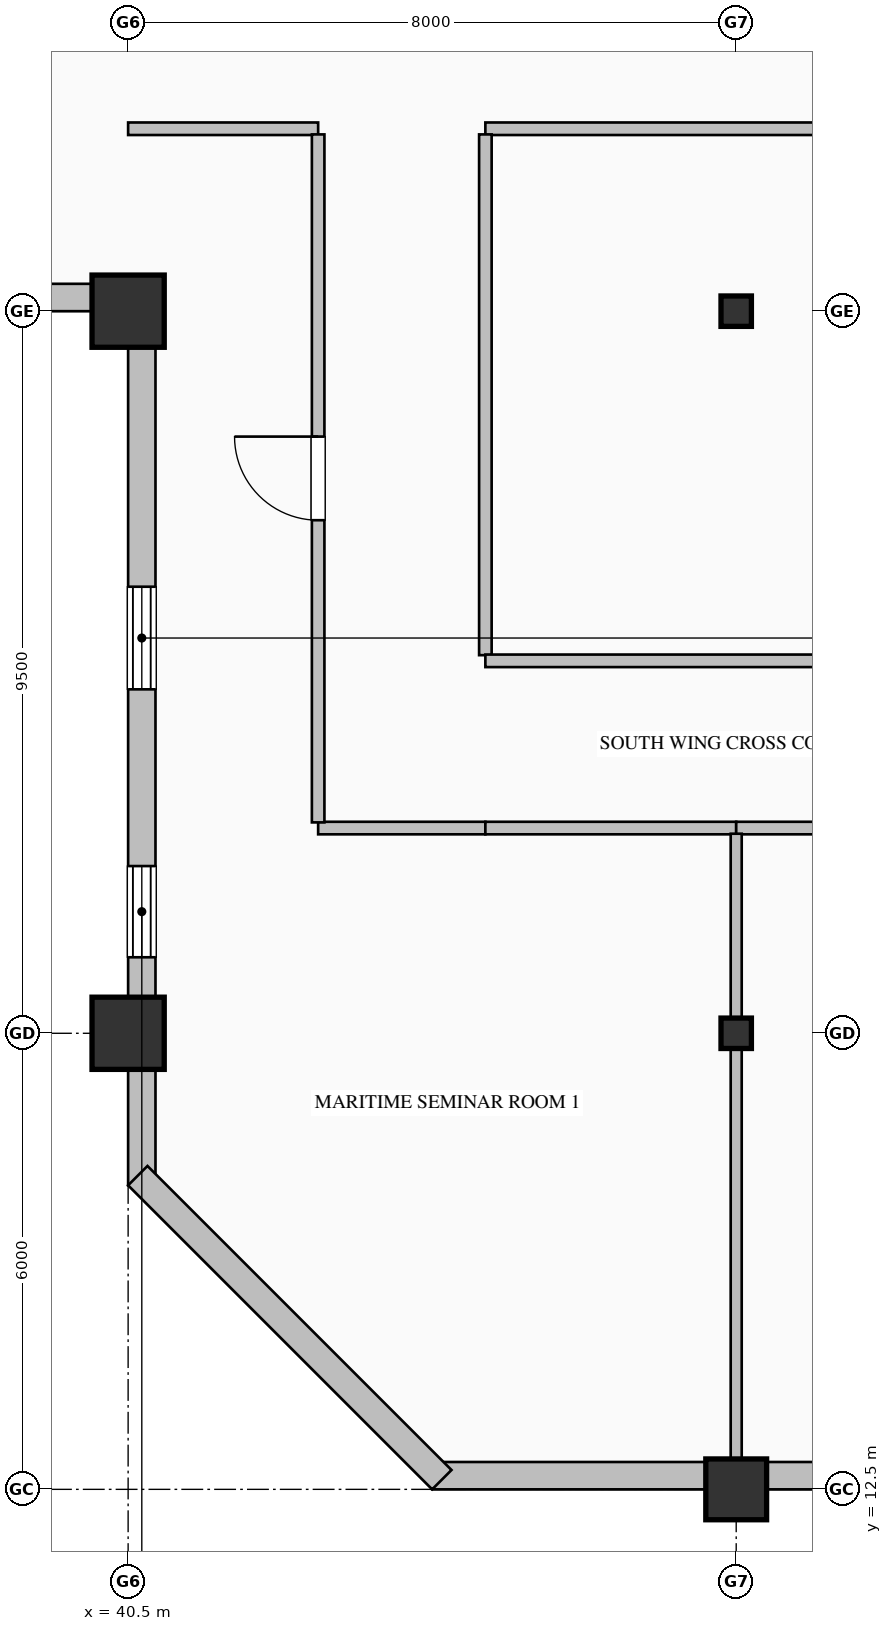
"""IFC4 building model, lengths in metres.
Left out: names, types, materials, properties, quantities, classifications, styles, units other than length and angle.
Written with IfcOpenShell. Run it as: python <this file> out.ifc"""

import sys

from ifc_helpers import new_model, si_unit, direction, frame, frame_2d, origin, origin_2d, place, context, subcontext, project, spatial, rectangle, hollow_rectangle, i_section, extrude, element, fill, save


model = new_model("IFC4")
c1 = context("Model", 3, precision=1e-05, world=origin(), true_north=direction((0.0, 1.0)))
c2 = subcontext(c1, "Body", "Model", "MODEL_VIEW")
j1 = project(units=[si_unit("LENGTHUNIT", "METRE"), si_unit("PLANEANGLEUNIT", "RADIAN")], contexts=[c1])
p1 = place(None, origin())
s1 = spatial("IfcSite", under=j1, at=p1, CompositionType="ELEMENT")
p2 = place(p1, origin())
s2 = spatial("IfcBuilding", under=s1, at=p2, CompositionType="ELEMENT")
p3 = place(p2, frame((0.0, 0.0, 225.8)))
s3 = spatial("IfcBuildingStorey", under=s2, at=p3, CompositionType="ELEMENT", Elevation=225.8)
for number, where, z_axis, x_axis in (
    (1, (40.5, 18.5, 0.0), (0.0, 0.0, 1.0), (1.0, 0.0, 0.0)),
    (2, (40.5, 28.0, 0.0), (0.0, 0.0, 1.0), (1.0, 0.0, 0.0)),
):
    element("IfcColumn", number, at=place(p3, frame(where, z_axis=z_axis, x_axis=x_axis)), inside=s3, PredefinedType="COLUMN", context=c2, shape_type="SweptSolid", body=[
        extrude(hollow_rectangle(XDim=0.95, YDim=0.95, WallThickness=0.036, at=origin_2d()), origin(), (0.0, 0.0, 1.0), 4.0),
    ])
p4 = place(p3, frame((48.5, 12.5, 0.0), z_axis=(0.0, 0.0, 1.0), x_axis=(1.0, 0.0, 0.0)))
e3 = element("IfcColumn", 3, at=p4, inside=s3, PredefinedType="COLUMN", context=c2, shape_type="SweptSolid", body=[
    extrude(hollow_rectangle(XDim=0.8, YDim=0.8, WallThickness=0.032, at=origin_2d()), origin(), (0.0, 0.0, 1.0), 4.0),
])
for number, where, z_axis, x_axis in (
    (4, (48.5, 18.5, 0.0), (0.0, 0.0, 1.0), (1.0, 0.0, 0.0)),
    (5, (48.5, 28.0, 0.0), (0.0, 0.0, 1.0), (1.0, 0.0, 0.0)),
):
    element("IfcColumn", number, at=place(p3, frame(where, z_axis=z_axis, x_axis=x_axis)), inside=s3, PredefinedType="COLUMN", context=c2, shape_type="SweptSolid", body=[
        extrude(i_section(OverallWidth=0.4, OverallDepth=0.4, WebThickness=0.013, FlangeThickness=0.021, FilletRadius=0.022, at=origin_2d()), origin(), (0.0, 0.0, 1.0), 4.0),
    ])
p5 = place(p3, frame((40.68, 16.5, 0.0), z_axis=(0.0, 0.0, 1.0), x_axis=(0.0, 1.0, 0.0)))
e6 = element("IfcWall", 6, at=p5, inside=s3, PredefinedType="SOLIDWALL", context=c2, shape_type="SweptSolid", body=[
    extrude(rectangle(XDim=11.86, YDim=0.36, at=frame_2d((5.93, 0.0))), origin(), (0.0, 0.0, 1.0), 3.187),
])
p6 = place(p5, frame((3.0, 0.0, 0.9)))
e7 = element("IfcOpeningElement", 7, at=p6, cuts=e6, PredefinedType="OPENING", context=c2, shape_type="SweptSolid", body=[
    extrude(rectangle(XDim=1.2, YDim=1.85, at=frame_2d((0.6, 0.925))), frame((0.0, 0.19, 0.0), z_axis=(0.0, -1.0, 0.0), x_axis=(1.0, 0.0, 0.0)), (0.0, 0.0, 1.0), 0.38),
])
p7 = place(p5, frame((6.525, 0.0, 0.9)))
e8 = element("IfcOpeningElement", 8, at=p7, cuts=e6, PredefinedType="OPENING", context=c2, shape_type="SweptSolid", body=[
    extrude(rectangle(XDim=1.35, YDim=1.85, at=frame_2d((0.675, 0.925))), frame((0.0, 0.19, 0.0), z_axis=(0.0, -1.0, 0.0), x_axis=(1.0, 0.0, 0.0)), (0.0, 0.0, 1.0), 0.38),
])
p8 = place(p3, frame((40.52, 28.18, 0.0), z_axis=(0.0, 0.0, 1.0), x_axis=(-1.0, 0.0, 0.0)))
e9 = element("IfcWall", 9, at=p8, inside=s3, PredefinedType="SOLIDWALL", context=c2, shape_type="SweptSolid", body=[
    extrude(rectangle(XDim=27.52, YDim=0.36, at=frame_2d((13.76, 0.0))), origin(), (0.0, 0.0, 1.0), 3.187),
])
p9 = place(p8, frame((10.2, 0.0, 0.9)))
e10 = element("IfcOpeningElement", 10, at=p9, cuts=e9, PredefinedType="OPENING", context=c2, shape_type="SweptSolid", body=[
    extrude(rectangle(XDim=1.2, YDim=1.85, at=frame_2d((0.6, 0.925))), frame((0.0, 0.19, 0.0), z_axis=(0.0, -1.0, 0.0), x_axis=(1.0, 0.0, 0.0)), (0.0, 0.0, 1.0), 0.38),
])
p10 = place(p8, frame((13.725, 0.0, 0.9)))
e11 = element("IfcOpeningElement", 11, at=p10, cuts=e9, PredefinedType="OPENING", context=c2, shape_type="SweptSolid", body=[
    extrude(rectangle(XDim=1.35, YDim=1.85, at=frame_2d((0.675, 0.925))), frame((0.0, 0.19, 0.0), z_axis=(0.0, -1.0, 0.0), x_axis=(1.0, 0.0, 0.0)), (0.0, 0.0, 1.0), 0.38),
])
p11 = place(p8, frame((17.4, 0.0, 0.7)))
e12 = element("IfcOpeningElement", 12, at=p11, cuts=e9, PredefinedType="OPENING", context=c2, shape_type="SweptSolid", body=[
    extrude(rectangle(XDim=1.2, YDim=1.85, at=frame_2d((0.6, 0.925))), frame((0.0, 0.19, 0.0), z_axis=(0.0, -1.0, 0.0), x_axis=(1.0, 0.0, 0.0)), (0.0, 0.0, 1.0), 0.38),
])
p12 = place(p8, frame((21.0, 0.0, 0.9)))
e13 = element("IfcOpeningElement", 13, at=p12, cuts=e9, PredefinedType="OPENING", context=c2, shape_type="SweptSolid", body=[
    extrude(rectangle(XDim=1.2, YDim=1.85, at=frame_2d((0.6, 0.925))), frame((0.0, 0.19, 0.0), z_axis=(0.0, -1.0, 0.0), x_axis=(1.0, 0.0, 0.0)), (0.0, 0.0, 1.0), 0.38),
])
p13 = place(p3, frame((60.0, 12.68, 0.0), z_axis=(0.0, 0.0, 1.0), x_axis=(-1.0, 0.0, 0.0)))
e14 = element("IfcWall", 14, at=p13, inside=s3, PredefinedType="SOLIDWALL", context=c2, shape_type="SweptSolid", body=[
    extrude(rectangle(XDim=15.5, YDim=0.36, at=frame_2d((7.75, 0.0))), origin(), (0.0, 0.0, 1.0), 3.325),
])
p14 = place(p13, frame((6.6, 0.0, 0.9)))
e15 = element("IfcOpeningElement", 15, at=p14, cuts=e14, PredefinedType="OPENING", context=c2, shape_type="SweptSolid", body=[
    extrude(rectangle(XDim=1.2, YDim=1.85, at=frame_2d((0.6, 0.925))), frame((0.0, 0.19, 0.0), z_axis=(0.0, -1.0, 0.0), x_axis=(1.0, 0.0, 0.0)), (0.0, 0.0, 1.0), 0.38),
])
p15 = place(p3, frame((44.627, 12.627, 0.0), z_axis=(0.0, 0.0, 1.0), x_axis=(-0.707106781187, 0.707106781187, 0.0)))
e16 = element("IfcWall", 16, at=p15, inside=s3, PredefinedType="SOLIDWALL", context=c2, shape_type="SweptSolid", body=[
    extrude(rectangle(XDim=5.657, YDim=0.36, at=frame_2d((2.828, 0.0))), origin(), (0.0, 0.0, 1.0), 3.775),
])
p16 = place(p3, frame((56.5, 30.4, 0.0), z_axis=(0.0, 0.0, 1.0), x_axis=(-1.0, 0.0, 0.0)))
e17 = element("IfcWall", 17, at=p16, inside=s3, PredefinedType="PARTITIONING", context=c2, shape_type="SweptSolid", body=[
    extrude(rectangle(XDim=11.3, YDim=0.165, at=frame_2d((5.65, 0.0))), origin(), (0.0, 0.0, 1.0), 3.775),
])
p17 = place(p3, frame((43.0, 30.4, 0.0), z_axis=(0.0, 0.0, 1.0), x_axis=(-1.0, 0.0, 0.0)))
e18 = element("IfcWall", 18, at=p17, inside=s3, PredefinedType="PARTITIONING", context=c2, shape_type="SweptSolid", body=[
    extrude(rectangle(XDim=2.5, YDim=0.165, at=frame_2d((1.25, 0.0))), origin(), (0.0, 0.0, 1.0), 3.775),
])
p18 = place(p3, frame((45.2, 30.325, 0.0), z_axis=(0.0, 0.0, 1.0), x_axis=(0.0, -1.0, 0.0)))
e19 = element("IfcWall", 19, at=p18, inside=s3, PredefinedType="PARTITIONING", context=c2, shape_type="SweptSolid", body=[
    extrude(rectangle(XDim=6.851, YDim=0.165, at=frame_2d((3.425, 0.0))), origin(), (0.0, 0.0, 1.0), 3.775),
])
p19 = place(p3, frame((45.2, 21.2, 0.0), z_axis=(0.0, 0.0, 1.0), x_axis=(-1.0, 0.0, 0.0)))
e20 = element("IfcWall", 20, at=p19, inside=s3, PredefinedType="PARTITIONING", context=c2, shape_type="SweptSolid", body=[
    extrude(rectangle(XDim=2.2, YDim=0.165, at=frame_2d((1.1, 0.0))), origin(), (0.0, 0.0, 1.0), 3.775),
])
p20 = place(p3, frame((43.0, 21.274, 0.0), z_axis=(0.0, 0.0, 1.0), x_axis=(0.0, 1.0, 0.0)))
e21 = element("IfcWall", 21, at=p20, inside=s3, PredefinedType="PARTITIONING", context=c2, shape_type="SweptSolid", body=[
    extrude(rectangle(XDim=9.051, YDim=0.165, at=frame_2d((4.525, 0.0))), origin(), (0.0, 0.0, 1.0), 3.775),
])
p21 = place(p20, frame((3.976, 0.0, 0.0)))
e22 = element("IfcOpeningElement", 22, at=p21, cuts=e21, PredefinedType="OPENING", context=c2, shape_type="SweptSolid", body=[
    extrude(rectangle(XDim=1.1, YDim=2.2, at=frame_2d((0.55, 1.1))), frame((0.0, 0.093, 0.0), z_axis=(0.0, -1.0, 0.0), x_axis=(1.0, 0.0, 0.0)), (0.0, 0.0, 1.0), 0.185),
])
p22 = place(p3, frame((45.2, 23.4, 0.0), z_axis=(0.0, 0.0, 1.0), x_axis=(1.0, 0.0, 0.0)))
e23 = element("IfcWall", 23, at=p22, inside=s3, PredefinedType="PARTITIONING", context=c2, shape_type="SweptSolid", body=[
    extrude(rectangle(XDim=12.8, YDim=0.165, at=frame_2d((6.4, 0.0))), origin(), (0.0, 0.0, 1.0), 3.467),
])
p23 = place(p22, frame((5.9, 0.0, 0.0)))
e24 = element("IfcOpeningElement", 24, at=p23, cuts=e23, PredefinedType="OPENING", context=c2, shape_type="SweptSolid", body=[
    extrude(rectangle(XDim=1.0, YDim=2.15, at=frame_2d((0.5, 1.075))), frame((0.0, 0.093, 0.0), z_axis=(0.0, -1.0, 0.0), x_axis=(1.0, 0.0, 0.0)), (0.0, 0.0, 1.0), 0.185),
])
p24 = place(p3, frame((48.5, 21.2, 0.0), z_axis=(0.0, 0.0, 1.0), x_axis=(-1.0, 0.0, 0.0)))
e25 = element("IfcWall", 25, at=p24, inside=s3, PredefinedType="PARTITIONING", context=c2, shape_type="SweptSolid", body=[
    extrude(rectangle(XDim=3.3, YDim=0.165, at=frame_2d((1.65, 0.0))), origin(), (0.0, 0.0, 1.0), 3.775),
])
p25 = place(p3, frame((56.5, 21.2, 0.0), z_axis=(0.0, 0.0, 1.0), x_axis=(-1.0, 0.0, 0.0)))
e26 = element("IfcWall", 26, at=p25, inside=s3, PredefinedType="PARTITIONING", context=c2, shape_type="SweptSolid", body=[
    extrude(rectangle(XDim=8.0, YDim=0.165, at=frame_2d((4.0, 0.0))), origin(), (0.0, 0.0, 1.0), 3.775),
])
p26 = place(p25, frame((3.45, 0.0, 0.0)))
e27 = element("IfcOpeningElement", 27, at=p26, cuts=e26, PredefinedType="OPENING", context=c2, shape_type="SweptSolid", body=[
    extrude(rectangle(XDim=1.1, YDim=2.2, at=frame_2d((0.55, 1.1))), frame((0.0, 0.093, 0.0), z_axis=(0.0, -1.0, 0.0), x_axis=(1.0, 0.0, 0.0)), (0.0, 0.0, 1.0), 0.185),
])
p27 = place(p3, frame((48.5, 21.125, 0.0), z_axis=(0.0, 0.0, 1.0), x_axis=(0.0, -1.0, 0.0)))
e28 = element("IfcWall", 28, at=p27, inside=s3, PredefinedType="PARTITIONING", context=c2, shape_type="SweptSolid", body=[
    extrude(rectangle(XDim=8.273, YDim=0.145, at=frame_2d((4.137, 0.0))), origin(), (0.0, 0.0, 1.0), 2.967),
])
p28 = place(p6, origin())
e29 = element("IfcWindow", 29, at=p28, inside=s3, PartitioningType="DOUBLE_PANEL_VERTICAL", PredefinedType="WINDOW", context=c2, shape_type="SweptSolid", body=[
    extrude(rectangle(XDim=1.2, YDim=1.85, at=frame_2d((0.6, 0.925))), frame((0.0, 0.15, 0.0), z_axis=(0.0, -1.0, 0.0), x_axis=(1.0, 0.0, 0.0)), (0.0, 0.0, 1.0), 0.06),
])
fill(e7, e29)
p29 = place(p7, origin())
e30 = element("IfcWindow", 30, at=p29, inside=s3, PartitioningType="DOUBLE_PANEL_VERTICAL", PredefinedType="WINDOW", context=c2, shape_type="SweptSolid", body=[
    extrude(rectangle(XDim=1.35, YDim=1.85, at=frame_2d((0.675, 0.925))), frame((0.0, 0.15, 0.0), z_axis=(0.0, -1.0, 0.0), x_axis=(1.0, 0.0, 0.0)), (0.0, 0.0, 1.0), 0.06),
])
fill(e8, e30)
p30 = place(p21, origin())
e31 = element("IfcDoor", 31, at=p30, inside=s3, OperationType="SINGLE_SWING_RIGHT", PredefinedType="DOOR", context=c2, shape_type="SweptSolid", body=[
    extrude(rectangle(XDim=1.1, YDim=2.2, at=frame_2d((0.55, 1.1))), frame((0.0, 0.025, 0.0), z_axis=(0.0, -1.0, 0.0), x_axis=(1.0, 0.0, 0.0)), (0.0, 0.0, 1.0), 0.05),
])
fill(e22, e31)
save(model, sys.argv[1])
